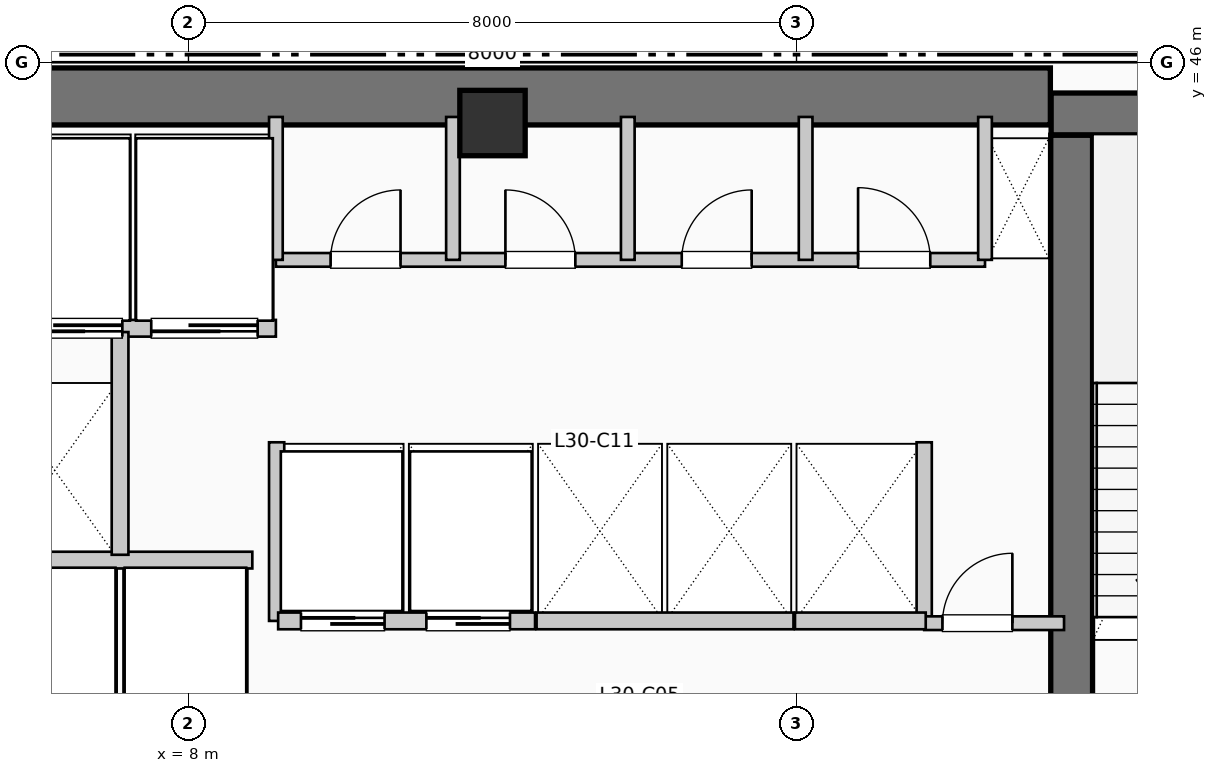
"""IFC4 building model, lengths in metres.
Left out: names, types, materials, properties, quantities, classifications, styles, units other than length and angle.
Written with IfcOpenShell. Run it as: python <this file> out.ifc"""

import sys

from ifc_helpers import new_model, si_unit, direction, frame, frame_2d, origin, origin_2d, place, context, subcontext, project, spatial, rectangle, extrude, element, fill, save


model = new_model("IFC4")
c1 = context("Model", 3, precision=1e-05, world=origin(), true_north=direction((0.0, 1.0)))
c2 = subcontext(c1, "Body", "Model", "MODEL_VIEW")
j1 = project(units=[si_unit("LENGTHUNIT", "METRE"), si_unit("PLANEANGLEUNIT", "RADIAN")], contexts=[c1])
p1 = place(None, origin())
s1 = spatial("IfcSite", under=j1, at=p1, CompositionType="ELEMENT")
p2 = place(p1, origin())
s2 = spatial("IfcBuilding", under=s1, at=p2, CompositionType="ELEMENT")
p3 = place(p2, frame((0.0, 0.0, 126.39)))
s3 = spatial("IfcBuildingStorey", under=s2, at=p3, CompositionType="ELEMENT", Elevation=126.39)
p4 = place(p3, frame((5.36, 45.55, 0.0), z_axis=(0.0, 0.0, 1.0), x_axis=(1.0, 0.0, 0.0)))
e1 = element("IfcWall", 1, at=p4, inside=s3, PredefinedType="SHEAR", context=c2, shape_type="SweptSolid", body=[
    extrude(rectangle(XDim=13.98, YDim=0.75, at=frame_2d((6.99, 0.0))), origin(), (0.0, 0.0, 1.0), 3.96),
])
p5 = place(p3, frame((19.62, 37.15, 0.0), z_axis=(0.0, 0.0, 1.0), x_axis=(0.0, 1.0, 0.0)))
e2 = element("IfcWall", 2, at=p5, inside=s3, PredefinedType="SHEAR", context=c2, shape_type="SweptSolid", body=[
    extrude(rectangle(XDim=7.89, YDim=0.55, at=frame_2d((3.945, 0.0))), origin(), (0.0, 0.0, 1.0), 3.96),
])
p6 = place(p3, frame((19.35, 45.32, 0.0), z_axis=(0.0, 0.0, 1.0), x_axis=(1.0, 0.0, 0.0)))
e3 = element("IfcWall", 3, at=p6, inside=s3, PredefinedType="SHEAR", context=c2, shape_type="SweptSolid", body=[
    extrude(rectangle(XDim=3.69, YDim=0.55, at=frame_2d((1.845, 0.0))), origin(), (0.0, 0.0, 1.0), 3.96),
])
p7 = place(p6, frame((1.15, 0.0, 1.05)))
e4 = element("IfcOpeningElement", 4, at=p7, cuts=e3, PredefinedType="OPENING", context=c2, shape_type="SweptSolid", body=[
    extrude(rectangle(XDim=1.4, YDim=1.8, at=frame_2d((0.7, 0.9))), frame((0.0, 0.285, 0.0), z_axis=(0.0, -1.0, 0.0), x_axis=(1.0, 0.0, 0.0)), (0.0, 0.0, 1.0), 0.57),
])
p8 = place(p3, frame((12.0, 45.2, 0.0), z_axis=(0.0, 0.0, 1.0), x_axis=(1.0, 0.0, 0.0)))
e5 = element("IfcColumn", 5, at=p8, inside=s3, PredefinedType="COLUMN", context=c2, shape_type="SweptSolid", body=[
    extrude(rectangle(XDim=0.86, YDim=0.86, at=origin_2d()), origin(), (0.0, 0.0, 1.0), 3.96),
])
p9 = place(p3, frame((5.38, 39.45, 0.0), z_axis=(0.0, 0.0, 1.0), x_axis=(1.0, 0.0, 0.0)))
e6 = element("IfcWall", 6, at=p9, inside=s3, PredefinedType="PARTITIONING", context=c2, shape_type="SweptSolid", body=[
    extrude(rectangle(XDim=3.46, YDim=0.22, at=frame_2d((1.73, 0.0))), origin(), (0.0, 0.0, 1.0), 3.71),
])
p10 = place(p3, frame((5.38, 42.5, 0.0), z_axis=(0.0, 0.0, 1.0), x_axis=(1.0, 0.0, 0.0)))
e7 = element("IfcWall", 7, at=p10, inside=s3, PredefinedType="PARTITIONING", context=c2, shape_type="SweptSolid", body=[
    extrude(rectangle(XDim=3.77, YDim=0.22, at=frame_2d((1.885, 0.0))), origin(), (0.0, 0.0, 1.0), 3.71),
])
p11 = place(p10, frame((1.75, 0.0, 0.0), z_axis=(0.0, 0.0, 1.0), x_axis=(-1.0, 0.0, 0.0)))
e8 = element("IfcOpeningElement", 8, at=p11, cuts=e7, PredefinedType="OPENING", context=c2, shape_type="SweptSolid", body=[
    extrude(rectangle(XDim=1.4, YDim=2.2, at=frame_2d((0.7, 1.1))), frame((0.0, 0.12, 0.0), z_axis=(0.0, -1.0, 0.0), x_axis=(1.0, 0.0, 0.0)), (0.0, 0.0, 1.0), 0.24),
])
p12 = place(p10, frame((3.53, 0.0, 0.0), z_axis=(0.0, 0.0, 1.0), x_axis=(-1.0, 0.0, 0.0)))
e9 = element("IfcOpeningElement", 9, at=p12, cuts=e7, PredefinedType="OPENING", context=c2, shape_type="SweptSolid", body=[
    extrude(rectangle(XDim=1.4, YDim=2.2, at=frame_2d((0.7, 1.1))), frame((0.0, 0.12, 0.0), z_axis=(0.0, -1.0, 0.0), x_axis=(1.0, 0.0, 0.0)), (0.0, 0.0, 1.0), 0.24),
])
p13 = place(p3, frame((7.1, 39.52, 0.0), z_axis=(0.0, 0.0, 1.0), x_axis=(0.0, 1.0, 0.0)))
e10 = element("IfcWall", 10, at=p13, inside=s3, PredefinedType="PARTITIONING", context=c2, shape_type="SweptSolid", body=[
    extrude(rectangle(XDim=2.93, YDim=0.22, at=frame_2d((1.465, 0.0))), origin(), (0.0, 0.0, 1.0), 3.71),
])
for number, where, z_axis, x_axis in (
    (11, (9.16, 38.65, 0.0), (0.0, 0.0, 1.0), (0.0, 1.0, 0.0)),
    (12, (17.68, 38.65, 0.0), (0.0, 0.0, 1.0), (0.0, 1.0, 0.0)),
):
    element("IfcWall", number, at=place(p3, frame(where, z_axis=z_axis, x_axis=x_axis)), inside=s3, PredefinedType="PARTITIONING", context=c2, shape_type="SweptSolid", body=[
        extrude(rectangle(XDim=2.35, YDim=0.2, at=frame_2d((1.175, 0.0))), origin(), (0.0, 0.0, 1.0), 3.71),
    ])
p14 = place(p3, frame((17.68, 38.62, 0.0), z_axis=(0.0, 0.0, 1.0), x_axis=(1.0, 0.0, 0.0)))
e13 = element("IfcWall", 13, at=p14, inside=s3, PredefinedType="PARTITIONING", context=c2, shape_type="SweptSolid", body=[
    extrude(rectangle(XDim=1.84, YDim=0.18, at=frame_2d((0.92, 0.0))), origin(), (0.0, 0.0, 1.0), 3.71),
])
p15 = place(p14, frame((0.24, 0.0, 0.0)))
e14 = element("IfcOpeningElement", 14, at=p15, cuts=e13, PredefinedType="OPENING", context=c2, shape_type="SweptSolid", body=[
    extrude(rectangle(XDim=0.92, YDim=2.1, at=frame_2d((0.46, 1.05))), frame((0.0, 0.1, 0.0), z_axis=(0.0, -1.0, 0.0), x_axis=(1.0, 0.0, 0.0)), (0.0, 0.0, 1.0), 0.2),
])
p16 = place(p3, frame((9.18, 38.65, 0.0), z_axis=(0.0, 0.0, 1.0), x_axis=(1.0, 0.0, 0.0)))
e15 = element("IfcWall", 15, at=p16, inside=s3, PredefinedType="PARTITIONING", context=c2, shape_type="SweptSolid", body=[
    extrude(rectangle(XDim=3.38, YDim=0.22, at=frame_2d((1.69, 0.0))), origin(), (0.0, 0.0, 1.0), 3.71),
])
p17 = place(p16, frame((0.3, 0.0, 0.0)))
e16 = element("IfcOpeningElement", 16, at=p17, cuts=e15, PredefinedType="OPENING", context=c2, shape_type="SweptSolid", body=[
    extrude(rectangle(XDim=1.1, YDim=2.2, at=frame_2d((0.55, 1.1))), frame((0.0, 0.12, 0.0), z_axis=(0.0, -1.0, 0.0), x_axis=(1.0, 0.0, 0.0)), (0.0, 0.0, 1.0), 0.24),
])
p18 = place(p16, frame((1.95, 0.0, 0.0)))
e17 = element("IfcOpeningElement", 17, at=p18, cuts=e15, PredefinedType="OPENING", context=c2, shape_type="SweptSolid", body=[
    extrude(rectangle(XDim=1.1, YDim=2.2, at=frame_2d((0.55, 1.1))), frame((0.0, 0.12, 0.0), z_axis=(0.0, -1.0, 0.0), x_axis=(1.0, 0.0, 0.0)), (0.0, 0.0, 1.0), 0.24),
])
p19 = place(p3, frame((12.58, 38.65, 0.0), z_axis=(0.0, 0.0, 1.0), x_axis=(1.0, 0.0, 0.0)))
e18 = element("IfcWall", 18, at=p19, inside=s3, PredefinedType="PARTITIONING", context=c2, shape_type="SweptSolid", body=[
    extrude(rectangle(XDim=3.38, YDim=0.22, at=frame_2d((1.69, 0.0))), origin(), (0.0, 0.0, 1.0), 3.71),
])
p20 = place(p3, frame((15.98, 38.65, 0.0), z_axis=(0.0, 0.0, 1.0), x_axis=(1.0, 0.0, 0.0)))
e19 = element("IfcWall", 19, at=p20, inside=s3, PredefinedType="PARTITIONING", context=c2, shape_type="SweptSolid", body=[
    extrude(rectangle(XDim=1.72, YDim=0.22, at=frame_2d((0.86, 0.0))), origin(), (0.0, 0.0, 1.0), 3.71),
])
p21 = place(p3, frame((9.15, 43.4, 0.0), z_axis=(0.0, 0.0, 1.0), x_axis=(1.0, 0.0, 0.0)))
e20 = element("IfcWall", 20, at=p21, inside=s3, PredefinedType="PLUMBINGWALL", context=c2, shape_type="SweptSolid", body=[
    extrude(rectangle(XDim=9.33, YDim=0.18, at=frame_2d((4.665, 0.0))), origin(), (0.0, 0.0, 1.0), 3.71),
])
p22 = place(p21, frame((0.72, 0.0, 0.0)))
e21 = element("IfcOpeningElement", 21, at=p22, cuts=e20, PredefinedType="OPENING", context=c2, shape_type="SweptSolid", body=[
    extrude(rectangle(XDim=0.92, YDim=2.1, at=frame_2d((0.46, 1.05))), frame((0.0, 0.1, 0.0), z_axis=(0.0, -1.0, 0.0), x_axis=(1.0, 0.0, 0.0)), (0.0, 0.0, 1.0), 0.2),
])
p23 = place(p21, frame((3.02, 0.0, 0.0)))
e22 = element("IfcOpeningElement", 22, at=p23, cuts=e20, PredefinedType="OPENING", context=c2, shape_type="SweptSolid", body=[
    extrude(rectangle(XDim=0.92, YDim=2.1, at=frame_2d((0.46, 1.05))), frame((0.0, 0.1, 0.0), z_axis=(0.0, -1.0, 0.0), x_axis=(1.0, 0.0, 0.0)), (0.0, 0.0, 1.0), 0.2),
])
p24 = place(p21, frame((5.34, 0.0, 0.0)))
e23 = element("IfcOpeningElement", 23, at=p24, cuts=e20, PredefinedType="OPENING", context=c2, shape_type="SweptSolid", body=[
    extrude(rectangle(XDim=0.92, YDim=2.1, at=frame_2d((0.46, 1.05))), frame((0.0, 0.1, 0.0), z_axis=(0.0, -1.0, 0.0), x_axis=(1.0, 0.0, 0.0)), (0.0, 0.0, 1.0), 0.2),
])
p25 = place(p21, frame((7.66, 0.0, 0.0)))
e24 = element("IfcOpeningElement", 24, at=p25, cuts=e20, PredefinedType="OPENING", context=c2, shape_type="SweptSolid", body=[
    extrude(rectangle(XDim=0.95, YDim=2.1, at=frame_2d((0.475, 1.05))), frame((0.0, 0.1, 0.0), z_axis=(0.0, -1.0, 0.0), x_axis=(1.0, 0.0, 0.0)), (0.0, 0.0, 1.0), 0.2),
])
for number, where, z_axis, x_axis in (
    (25, (9.15, 43.4, 0.0), (0.0, 0.0, 1.0), (0.0, 1.0, 0.0)),
    (26, (18.48, 43.4, 0.0), (0.0, 0.0, 1.0), (0.0, 1.0, 0.0)),
    (27, (11.48, 43.4, 0.0), (0.0, 0.0, 1.0), (0.0, 1.0, 0.0)),
    (28, (13.78, 43.4, 0.0), (0.0, 0.0, 1.0), (0.0, 1.0, 0.0)),
    (29, (16.12, 43.4, 0.0), (0.0, 0.0, 1.0), (0.0, 1.0, 0.0)),
):
    element("IfcWall", number, at=place(p3, frame(where, z_axis=z_axis, x_axis=x_axis)), inside=s3, PredefinedType="PLUMBINGWALL", context=c2, shape_type="SweptSolid", body=[
        extrude(rectangle(XDim=1.88, YDim=0.18, at=frame_2d((0.94, 0.0))), origin(), (0.0, 0.0, 1.0), 3.71),
    ])
p26 = place(p11, origin())
e30 = element("IfcDoor", 30, at=p26, inside=s3, OperationType="SLIDING_TO_LEFT", PredefinedType="DOOR", context=c2, shape_type="SweptSolid", body=[
    extrude(rectangle(XDim=1.4, YDim=2.2, at=frame_2d((0.7, 1.1))), frame((0.0, 0.025, 0.0), z_axis=(0.0, -1.0, 0.0), x_axis=(1.0, 0.0, 0.0)), (0.0, 0.0, 1.0), 0.05),
])
fill(e8, e30)
p27 = place(p12, origin())
e31 = element("IfcDoor", 31, at=p27, inside=s3, OperationType="SLIDING_TO_LEFT", PredefinedType="DOOR", context=c2, shape_type="SweptSolid", body=[
    extrude(rectangle(XDim=1.4, YDim=2.2, at=frame_2d((0.7, 1.1))), frame((0.0, 0.025, 0.0), z_axis=(0.0, -1.0, 0.0), x_axis=(1.0, 0.0, 0.0)), (0.0, 0.0, 1.0), 0.05),
])
fill(e9, e31)
p28 = place(p15, origin())
e32 = element("IfcDoor", 32, at=p28, inside=s3, OperationType="SINGLE_SWING_RIGHT", PredefinedType="DOOR", context=c2, shape_type="SweptSolid", body=[
    extrude(rectangle(XDim=0.92, YDim=2.1, at=frame_2d((0.46, 1.05))), frame((0.0, 0.025, 0.0), z_axis=(0.0, -1.0, 0.0), x_axis=(1.0, 0.0, 0.0)), (0.0, 0.0, 1.0), 0.05),
])
fill(e14, e32)
p29 = place(p17, origin())
e33 = element("IfcDoor", 33, at=p29, inside=s3, OperationType="SLIDING_TO_LEFT", PredefinedType="DOOR", context=c2, shape_type="SweptSolid", body=[
    extrude(rectangle(XDim=1.1, YDim=2.2, at=frame_2d((0.55, 1.1))), frame((0.0, 0.025, 0.0), z_axis=(0.0, -1.0, 0.0), x_axis=(1.0, 0.0, 0.0)), (0.0, 0.0, 1.0), 0.05),
])
fill(e16, e33)
p30 = place(p18, origin())
e34 = element("IfcDoor", 34, at=p30, inside=s3, OperationType="SLIDING_TO_LEFT", PredefinedType="DOOR", context=c2, shape_type="SweptSolid", body=[
    extrude(rectangle(XDim=1.1, YDim=2.2, at=frame_2d((0.55, 1.1))), frame((0.0, 0.025, 0.0), z_axis=(0.0, -1.0, 0.0), x_axis=(1.0, 0.0, 0.0)), (0.0, 0.0, 1.0), 0.05),
])
fill(e17, e34)
p31 = place(p22, origin())
e35 = element("IfcDoor", 35, at=p31, inside=s3, OperationType="SINGLE_SWING_RIGHT", PredefinedType="DOOR", context=c2, shape_type="SweptSolid", body=[
    extrude(rectangle(XDim=0.92, YDim=2.1, at=frame_2d((0.46, 1.05))), frame((0.0, 0.025, 0.0), z_axis=(0.0, -1.0, 0.0), x_axis=(1.0, 0.0, 0.0)), (0.0, 0.0, 1.0), 0.05),
])
fill(e21, e35)
p32 = place(p23, origin())
e36 = element("IfcDoor", 36, at=p32, inside=s3, OperationType="SINGLE_SWING_LEFT", PredefinedType="DOOR", context=c2, shape_type="SweptSolid", body=[
    extrude(rectangle(XDim=0.92, YDim=2.1, at=frame_2d((0.46, 1.05))), frame((0.0, 0.025, 0.0), z_axis=(0.0, -1.0, 0.0), x_axis=(1.0, 0.0, 0.0)), (0.0, 0.0, 1.0), 0.05),
])
fill(e22, e36)
p33 = place(p24, origin())
e37 = element("IfcDoor", 37, at=p33, inside=s3, OperationType="SINGLE_SWING_RIGHT", PredefinedType="DOOR", context=c2, shape_type="SweptSolid", body=[
    extrude(rectangle(XDim=0.92, YDim=2.1, at=frame_2d((0.46, 1.05))), frame((0.0, 0.025, 0.0), z_axis=(0.0, -1.0, 0.0), x_axis=(1.0, 0.0, 0.0)), (0.0, 0.0, 1.0), 0.05),
])
fill(e23, e37)
p34 = place(p25, origin())
e38 = element("IfcDoor", 38, at=p34, inside=s3, OperationType="SINGLE_SWING_LEFT", PredefinedType="DOOR", context=c2, shape_type="SweptSolid", body=[
    extrude(rectangle(XDim=0.95, YDim=2.1, at=frame_2d((0.475, 1.05))), frame((0.0, 0.025, 0.0), z_axis=(0.0, -1.0, 0.0), x_axis=(1.0, 0.0, 0.0)), (0.0, 0.0, 1.0), 0.05),
])
fill(e24, e38)
save(model, sys.argv[1])
